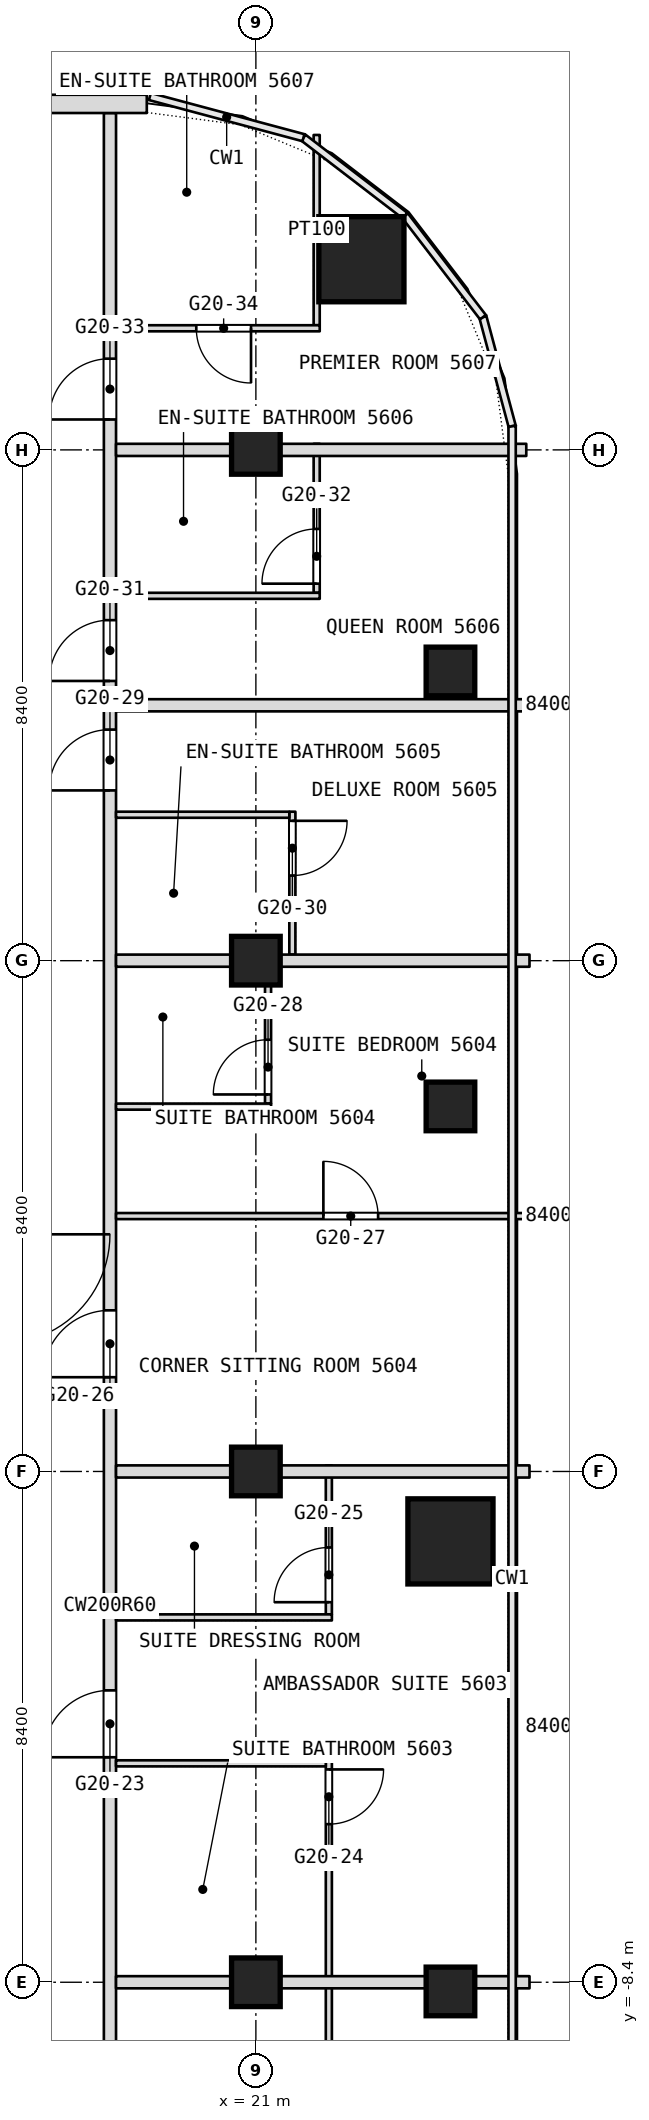
"""IFC4 building model, lengths in metres.
Left out: names, types, materials, properties, quantities, classifications, styles, units other than length and angle.
Written with IfcOpenShell. Run it as: python <this file> out.ifc"""

import sys

from ifc_helpers import new_model, si_unit, direction, frame, frame_2d, origin, origin_2d, place, context, subcontext, project, spatial, rectangle, extrude, element, fill, save


model = new_model("IFC4")
c1 = context("Model", 3, precision=1e-05, world=origin(), true_north=direction((0.0, 1.0)))
c2 = subcontext(c1, "Body", "Model", "MODEL_VIEW")
j1 = project(units=[si_unit("LENGTHUNIT", "METRE"), si_unit("PLANEANGLEUNIT", "RADIAN")], contexts=[c1])
p1 = place(None, origin())
s1 = spatial("IfcSite", under=j1, at=p1, CompositionType="ELEMENT")
p2 = place(p1, origin())
s2 = spatial("IfcBuilding", under=s1, at=p2, CompositionType="ELEMENT")
p3 = place(p2, frame((0.0, 0.0, 238.1)))
s3 = spatial("IfcBuildingStorey", under=s2, at=p3, CompositionType="ELEMENT", Elevation=238.1)
for number, where, z_axis, x_axis in (
    (1, (24.2, -1.15, 0.0), (0.0, 0.0, 1.0), (1.0, 0.0, 0.0)),
    (2, (22.736, 19.936, 0.0), (0.0, 0.0, 1.0), (1.0, 0.0, 0.0)),
):
    element("IfcColumn", number, at=place(p3, frame(where, z_axis=z_axis, x_axis=x_axis)), inside=s3, PredefinedType="COLUMN", context=c2, shape_type="SweptSolid", body=[
        extrude(rectangle(XDim=1.4, YDim=1.4, at=origin_2d()), origin(), (0.0, 0.0, 1.0), 3.6),
    ])
for number, where, z_axis, x_axis in (
    (3, (21.0, -8.4, 0.0), (0.0, 0.0, 1.0), (1.0, 0.0, 0.0)),
    (4, (21.0, 0.0, 0.0), (0.0, 0.0, 1.0), (1.0, 0.0, 0.0)),
    (5, (21.0, 8.4, 0.0), (0.0, 0.0, 1.0), (1.0, 0.0, 0.0)),
    (6, (21.0, 16.8, 0.0), (0.0, 0.0, 1.0), (1.0, 0.0, 0.0)),
    (7, (24.2, 13.156, 0.0), (0.0, 0.0, 1.0), (1.0, 0.0, 0.0)),
    (8, (24.2, 6.003, 0.0), (0.0, 0.0, 1.0), (1.0, 0.0, 0.0)),
    (9, (24.2, -8.551, 0.0), (0.0, 0.0, 1.0), (1.0, 0.0, 0.0)),
):
    element("IfcColumn", number, at=place(p3, frame(where, z_axis=z_axis, x_axis=x_axis)), inside=s3, PredefinedType="COLUMN", context=c2, shape_type="SweptSolid", body=[
        extrude(rectangle(XDim=0.8, YDim=0.8, at=origin_2d()), origin(), (0.0, 0.0, 1.0), 3.6),
    ])
p4 = place(p3, frame((22.2, -11.95, 0.0), z_axis=(0.0, 0.0, 1.0), x_axis=(0.0, 1.0, 0.0)))
e10 = element("IfcWall", 10, at=p4, inside=s3, PredefinedType="PARTITIONING", context=c2, shape_type="SweptSolid", body=[
    extrude(rectangle(XDim=7.2, YDim=0.1, at=frame_2d((3.6, 0.0))), origin(), (0.0, 0.0, 1.0), 3.34),
])
p5 = place(p4, frame((0.15, 0.0, 0.0)))
e11 = element("IfcOpeningElement", 11, at=p5, cuts=e10, PredefinedType="OPENING", context=c2, shape_type="SweptSolid", body=[
    extrude(rectangle(XDim=0.9, YDim=2.1, at=frame_2d((0.45, 1.05))), frame((0.0, 0.05, 0.0), z_axis=(0.0, -1.0, 0.0), x_axis=(1.0, 0.0, 0.0)), (0.0, 0.0, 1.0), 0.1),
])
p6 = place(p4, frame((6.15, 0.0, 0.0)))
e12 = element("IfcOpeningElement", 12, at=p6, cuts=e10, PredefinedType="OPENING", context=c2, shape_type="SweptSolid", body=[
    extrude(rectangle(XDim=0.9, YDim=2.1, at=frame_2d((0.45, 1.05))), frame((0.0, 0.05, 0.0), z_axis=(0.0, -1.0, 0.0), x_axis=(1.0, 0.0, 0.0)), (0.0, 0.0, 1.0), 0.1),
])
p7 = place(p3, frame((22.2, -2.35, 0.0), z_axis=(0.0, 0.0, 1.0), x_axis=(0.0, 1.0, 0.0)))
e13 = element("IfcWall", 13, at=p7, inside=s3, PredefinedType="PARTITIONING", context=c2, shape_type="SweptSolid", body=[
    extrude(rectangle(XDim=2.45, YDim=0.1, at=frame_2d((1.225, 0.0))), origin(), (0.0, 0.0, 1.0), 3.34),
])
p8 = place(p7, frame((0.2, 0.0, 0.0)))
e14 = element("IfcOpeningElement", 14, at=p8, cuts=e13, PredefinedType="OPENING", context=c2, shape_type="SweptSolid", body=[
    extrude(rectangle(XDim=0.9, YDim=2.1, at=frame_2d((0.45, 1.05))), frame((0.0, 0.05, 0.0), z_axis=(0.0, -1.0, 0.0), x_axis=(1.0, 0.0, 0.0)), (0.0, 0.0, 1.0), 0.1),
])
p9 = place(p3, frame((22.0, 14.45, 0.0), z_axis=(0.0, 0.0, 1.0), x_axis=(0.0, 1.0, 0.0)))
e15 = element("IfcWall", 15, at=p9, inside=s3, PredefinedType="PARTITIONING", context=c2, shape_type="SweptSolid", body=[
    extrude(rectangle(XDim=2.45, YDim=0.1, at=frame_2d((1.225, 0.0))), origin(), (0.0, 0.0, 1.0), 3.34),
])
p10 = place(p9, frame((0.15, 0.0, 0.0)))
e16 = element("IfcOpeningElement", 16, at=p10, cuts=e15, PredefinedType="OPENING", context=c2, shape_type="SweptSolid", body=[
    extrude(rectangle(XDim=0.9, YDim=2.1, at=frame_2d((0.45, 1.05))), frame((0.0, 0.05, 0.0), z_axis=(0.0, -1.0, 0.0), x_axis=(1.0, 0.0, 0.0)), (0.0, 0.0, 1.0), 0.1),
])
p11 = place(p3, frame((22.0, 18.85, 0.0), z_axis=(0.0, 0.0, 1.0), x_axis=(0.0, 1.0, 0.0)))
e17 = element("IfcWall", 17, at=p11, inside=s3, PredefinedType="PARTITIONING", context=c2, shape_type="SweptSolid", body=[
    extrude(rectangle(XDim=3.129, YDim=0.1, at=frame_2d((1.564, 0.0))), origin(), (0.0, 0.0, 1.0), 3.34),
])
p12 = place(p3, frame((21.6, 8.5, 0.0), z_axis=(0.0, 0.0, 1.0), x_axis=(0.0, 1.0, 0.0)))
e18 = element("IfcWall", 18, at=p12, inside=s3, PredefinedType="PARTITIONING", context=c2, shape_type="SweptSolid", body=[
    extrude(rectangle(XDim=2.35, YDim=0.1, at=frame_2d((1.175, 0.0))), origin(), (0.0, 0.0, 1.0), 3.34),
])
p13 = place(p12, frame((1.3, 0.0, 0.0)))
e19 = element("IfcOpeningElement", 19, at=p13, cuts=e18, PredefinedType="OPENING", context=c2, shape_type="SweptSolid", body=[
    extrude(rectangle(XDim=0.9, YDim=2.1, at=frame_2d((0.45, 1.05))), frame((0.0, 0.05, 0.0), z_axis=(0.0, -1.0, 0.0), x_axis=(1.0, 0.0, 0.0)), (0.0, 0.0, 1.0), 0.1),
])
p14 = place(p3, frame((21.2, 6.05, 0.0), z_axis=(0.0, 0.0, 1.0), x_axis=(0.0, 1.0, 0.0)))
e20 = element("IfcWall", 20, at=p14, inside=s3, PredefinedType="PARTITIONING", context=c2, shape_type="SweptSolid", body=[
    extrude(rectangle(XDim=2.45, YDim=0.1, at=frame_2d((1.225, 0.0))), origin(), (0.0, 0.0, 1.0), 3.34),
])
p15 = place(p14, frame((0.15, 0.0, 0.0)))
e21 = element("IfcOpeningElement", 21, at=p15, cuts=e20, PredefinedType="OPENING", context=c2, shape_type="SweptSolid", body=[
    extrude(rectangle(XDim=0.9, YDim=2.1, at=frame_2d((0.45, 1.05))), frame((0.0, 0.05, 0.0), z_axis=(0.0, -1.0, 0.0), x_axis=(1.0, 0.0, 0.0)), (0.0, 0.0, 1.0), 0.1),
])
p16 = place(p3, frame((18.6, -26.751, 0.0), z_axis=(0.0, 0.0, 1.0), x_axis=(0.0, 1.0, 0.0)))
e22 = element("IfcWall", 22, at=p16, inside=s3, PredefinedType="PARTITIONING", context=c2, shape_type="SweptSolid", body=[
    extrude(rectangle(XDim=49.091, YDim=0.2, at=frame_2d((24.545, 0.0))), origin(), (0.0, 0.0, 1.0), 3.34),
])
p17 = place(p16, frame((6.988, 0.0, 0.0)))
e23 = element("IfcOpeningElement", 23, at=p17, cuts=e22, PredefinedType="OPENING", context=c2, shape_type="SweptSolid", body=[
    extrude(rectangle(XDim=1.1, YDim=2.1, at=frame_2d((0.55, 1.05))), frame((0.0, 0.1, 0.0), z_axis=(0.0, -1.0, 0.0), x_axis=(1.0, 0.0, 0.0)), (0.0, 0.0, 1.0), 0.2),
])
p18 = place(p16, frame((13.551, 0.0, 0.0)))
e24 = element("IfcOpeningElement", 24, at=p18, cuts=e22, PredefinedType="OPENING", context=c2, shape_type="SweptSolid", body=[
    extrude(rectangle(XDim=1.1, YDim=2.1, at=frame_2d((0.55, 1.05))), frame((0.0, 0.1, 0.0), z_axis=(0.0, -1.0, 0.0), x_axis=(1.0, 0.0, 0.0)), (0.0, 0.0, 1.0), 0.2),
])
p19 = place(p16, frame((22.051, 0.0, 0.0)))
e25 = element("IfcOpeningElement", 25, at=p19, cuts=e22, PredefinedType="OPENING", context=c2, shape_type="SweptSolid", body=[
    extrude(rectangle(XDim=1.1, YDim=2.1, at=frame_2d((0.55, 1.05))), frame((0.0, 0.1, 0.0), z_axis=(0.0, -1.0, 0.0), x_axis=(1.0, 0.0, 0.0)), (0.0, 0.0, 1.0), 0.2),
])
p20 = place(p16, frame((28.301, 0.0, 0.0)))
e26 = element("IfcOpeningElement", 26, at=p20, cuts=e22, PredefinedType="OPENING", context=c2, shape_type="SweptSolid", body=[
    extrude(rectangle(XDim=1.1, YDim=2.1, at=frame_2d((0.55, 1.05))), frame((0.0, 0.1, 0.0), z_axis=(0.0, -1.0, 0.0), x_axis=(1.0, 0.0, 0.0)), (0.0, 0.0, 1.0), 0.2),
])
p21 = place(p16, frame((37.951, 0.0, 0.0)))
e27 = element("IfcOpeningElement", 27, at=p21, cuts=e22, PredefinedType="OPENING", context=c2, shape_type="SweptSolid", body=[
    extrude(rectangle(XDim=1.0, YDim=2.1, at=frame_2d((0.5, 1.05))), frame((0.0, 0.1, 0.0), z_axis=(0.0, -1.0, 0.0), x_axis=(1.0, 0.0, 0.0)), (0.0, 0.0, 1.0), 0.2),
])
p22 = place(p16, frame((39.751, 0.0, 0.0)))
e28 = element("IfcOpeningElement", 28, at=p22, cuts=e22, PredefinedType="OPENING", context=c2, shape_type="SweptSolid", body=[
    extrude(rectangle(XDim=1.0, YDim=2.1, at=frame_2d((0.5, 1.05))), frame((0.0, 0.1, 0.0), z_axis=(0.0, -1.0, 0.0), x_axis=(1.0, 0.0, 0.0)), (0.0, 0.0, 1.0), 0.2),
])
p23 = place(p16, frame((44.051, 0.0, 0.0)))
e29 = element("IfcOpeningElement", 29, at=p23, cuts=e22, PredefinedType="OPENING", context=c2, shape_type="SweptSolid", body=[
    extrude(rectangle(XDim=1.0, YDim=2.1, at=frame_2d((0.5, 1.05))), frame((0.0, 0.1, 0.0), z_axis=(0.0, -1.0, 0.0), x_axis=(1.0, 0.0, 0.0)), (0.0, 0.0, 1.0), 0.2),
])
p24 = place(p3, frame((18.7, -8.4, 0.0), z_axis=(0.0, 0.0, 1.0), x_axis=(1.0, 0.0, 0.0)))
e30 = element("IfcWall", 30, at=p24, inside=s3, PredefinedType="PARTITIONING", context=c2, shape_type="SweptSolid", body=[
    extrude(rectangle(XDim=6.8, YDim=0.2, at=frame_2d((3.4, 0.0))), origin(), (0.0, 0.0, 1.0), 2.94),
])
p25 = place(p3, frame((18.7, -4.8, 0.0), z_axis=(0.0, 0.0, 1.0), x_axis=(1.0, 0.0, 0.0)))
e31 = element("IfcWall", 31, at=p25, inside=s3, PredefinedType="PARTITIONING", context=c2, shape_type="SweptSolid", body=[
    extrude(rectangle(XDim=3.45, YDim=0.1, at=frame_2d((1.725, 0.0))), origin(), (0.0, 0.0, 1.0), 3.34),
])
p26 = place(p3, frame((18.7, -2.4, 0.0), z_axis=(0.0, 0.0, 1.0), x_axis=(1.0, 0.0, 0.0)))
e32 = element("IfcWall", 32, at=p26, inside=s3, PredefinedType="PARTITIONING", context=c2, shape_type="SweptSolid", body=[
    extrude(rectangle(XDim=3.55, YDim=0.1, at=frame_2d((1.775, 0.0))), origin(), (0.0, 0.0, 1.0), 3.34),
])
p27 = place(p3, frame((18.7, 0.0, 0.0), z_axis=(0.0, 0.0, 1.0), x_axis=(1.0, 0.0, 0.0)))
e33 = element("IfcWall", 33, at=p27, inside=s3, PredefinedType="PARTITIONING", context=c2, shape_type="SweptSolid", body=[
    extrude(rectangle(XDim=6.8, YDim=0.2, at=frame_2d((3.4, 0.0))), origin(), (0.0, 0.0, 1.0), 2.94),
])
p28 = place(p3, frame((18.7, 4.2, 0.0), z_axis=(0.0, 0.0, 1.0), x_axis=(1.0, 0.0, 0.0)))
e34 = element("IfcWall", 34, at=p28, inside=s3, PredefinedType="PARTITIONING", context=c2, shape_type="SweptSolid", body=[
    extrude(rectangle(XDim=6.8, YDim=0.1, at=frame_2d((3.4, 0.0))), origin(), (0.0, 0.0, 1.0), 3.34),
])
p29 = place(p28, frame((3.41, 0.0, 0.0)))
e35 = element("IfcOpeningElement", 35, at=p29, cuts=e34, PredefinedType="OPENING", context=c2, shape_type="SweptSolid", body=[
    extrude(rectangle(XDim=0.9, YDim=2.1, at=frame_2d((0.45, 1.05))), frame((0.0, 0.05, 0.0), z_axis=(0.0, -1.0, 0.0), x_axis=(1.0, 0.0, 0.0)), (0.0, 0.0, 1.0), 0.1),
])
p30 = place(p3, frame((18.7, 6.0, 0.0), z_axis=(0.0, 0.0, 1.0), x_axis=(1.0, 0.0, 0.0)))
e36 = element("IfcWall", 36, at=p30, inside=s3, PredefinedType="PARTITIONING", context=c2, shape_type="SweptSolid", body=[
    extrude(rectangle(XDim=2.55, YDim=0.1, at=frame_2d((1.275, 0.0))), origin(), (0.0, 0.0, 1.0), 3.34),
])
p31 = place(p3, frame((18.7, 8.4, 0.0), z_axis=(0.0, 0.0, 1.0), x_axis=(1.0, 0.0, 0.0)))
e37 = element("IfcWall", 37, at=p31, inside=s3, PredefinedType="PARTITIONING", context=c2, shape_type="SweptSolid", body=[
    extrude(rectangle(XDim=6.8, YDim=0.2, at=frame_2d((3.4, 0.0))), origin(), (0.0, 0.0, 1.0), 2.94),
])
p32 = place(p3, frame((18.7, 10.8, 0.0), z_axis=(0.0, 0.0, 1.0), x_axis=(1.0, 0.0, 0.0)))
e38 = element("IfcWall", 38, at=p32, inside=s3, PredefinedType="PARTITIONING", context=c2, shape_type="SweptSolid", body=[
    extrude(rectangle(XDim=2.85, YDim=0.1, at=frame_2d((1.425, 0.0))), origin(), (0.0, 0.0, 1.0), 3.34),
])
p33 = place(p3, frame((18.7, 12.6, 0.0), z_axis=(0.0, 0.0, 1.0), x_axis=(1.0, 0.0, 0.0)))
e39 = element("IfcWall", 39, at=p33, inside=s3, PredefinedType="PARTITIONING", context=c2, shape_type="SweptSolid", body=[
    extrude(rectangle(XDim=6.8, YDim=0.2, at=frame_2d((3.4, 0.0))), origin(), (0.0, 0.0, 1.0), 3.34),
])
p34 = place(p3, frame((18.7, 14.4, 0.0), z_axis=(0.0, 0.0, 1.0), x_axis=(1.0, 0.0, 0.0)))
e40 = element("IfcWall", 40, at=p34, inside=s3, PredefinedType="PARTITIONING", context=c2, shape_type="SweptSolid", body=[
    extrude(rectangle(XDim=3.35, YDim=0.1, at=frame_2d((1.675, 0.0))), origin(), (0.0, 0.0, 1.0), 3.34),
])
p35 = place(p3, frame((18.7, 16.8, 0.0), z_axis=(0.0, 0.0, 1.0), x_axis=(1.0, 0.0, 0.0)))
e41 = element("IfcWall", 41, at=p35, inside=s3, PredefinedType="PARTITIONING", context=c2, shape_type="SweptSolid", body=[
    extrude(rectangle(XDim=6.747, YDim=0.2, at=frame_2d((3.374, 0.0))), origin(), (0.0, 0.0, 1.0), 2.94),
])
p36 = place(p3, frame((18.7, 18.8, 0.0), z_axis=(0.0, 0.0, 1.0), x_axis=(1.0, 0.0, 0.0)))
e42 = element("IfcWall", 42, at=p36, inside=s3, PredefinedType="PARTITIONING", context=c2, shape_type="SweptSolid", body=[
    extrude(rectangle(XDim=3.35, YDim=0.1, at=frame_2d((1.675, 0.0))), origin(), (0.0, 0.0, 1.0), 3.34),
])
p37 = place(p36, frame((1.32, 0.0, 0.0)))
e43 = element("IfcOpeningElement", 43, at=p37, cuts=e42, PredefinedType="OPENING", context=c2, shape_type="SweptSolid", body=[
    extrude(rectangle(XDim=0.9, YDim=2.1, at=frame_2d((0.45, 1.05))), frame((0.0, 0.05, 0.0), z_axis=(0.0, -1.0, 0.0), x_axis=(1.0, 0.0, 0.0)), (0.0, 0.0, 1.0), 0.1),
])
p38 = place(p3, frame((19.206, 22.49, 0.0), z_axis=(0.0, 0.0, 1.0), x_axis=(-1.0, 0.0, 0.0)))
e44 = element("IfcWall", 44, at=p38, inside=s3, PredefinedType="NOTDEFINED", context=c2, shape_type="SweptSolid", body=[
    extrude(rectangle(XDim=38.412, YDim=0.3, at=frame_2d((19.206, 0.0))), origin(), (0.0, 0.0, 1.0), 3.6),
])
p39 = place(p38, frame((3.306, 0.0, 0.9)))
e45 = element("IfcOpeningElement", 45, at=p39, cuts=e44, PredefinedType="OPENING", context=c2, shape_type="SweptSolid", body=[
    extrude(rectangle(XDim=2.4, YDim=2.1, at=frame_2d((1.2, 1.05))), frame((0.0, 0.15, 0.0), z_axis=(0.0, -1.0, 0.0), x_axis=(1.0, 0.0, 0.0)), (0.0, 0.0, 1.0), 0.3),
])
p40 = place(p38, frame((7.506, 0.0, 0.9)))
e46 = element("IfcOpeningElement", 46, at=p40, cuts=e44, PredefinedType="OPENING", context=c2, shape_type="SweptSolid", body=[
    extrude(rectangle(XDim=2.4, YDim=2.1, at=frame_2d((1.2, 1.05))), frame((0.0, 0.15, 0.0), z_axis=(0.0, -1.0, 0.0), x_axis=(1.0, 0.0, 0.0)), (0.0, 0.0, 1.0), 0.3),
])
p41 = place(p38, frame((11.706, 0.0, 0.9)))
e47 = element("IfcOpeningElement", 47, at=p41, cuts=e44, PredefinedType="OPENING", context=c2, shape_type="SweptSolid", body=[
    extrude(rectangle(XDim=2.4, YDim=2.1, at=frame_2d((1.2, 1.05))), frame((0.0, 0.15, 0.0), z_axis=(0.0, -1.0, 0.0), x_axis=(1.0, 0.0, 0.0)), (0.0, 0.0, 1.0), 0.3),
])
p42 = place(p38, frame((15.906, 0.0, 0.9)))
e48 = element("IfcOpeningElement", 48, at=p42, cuts=e44, PredefinedType="OPENING", context=c2, shape_type="SweptSolid", body=[
    extrude(rectangle(XDim=2.4, YDim=2.1, at=frame_2d((1.2, 1.05))), frame((0.0, 0.15, 0.0), z_axis=(0.0, -1.0, 0.0), x_axis=(1.0, 0.0, 0.0)), (0.0, 0.0, 1.0), 0.3),
])
p43 = place(p38, frame((20.106, 0.0, 0.9)))
e49 = element("IfcOpeningElement", 49, at=p43, cuts=e44, PredefinedType="OPENING", context=c2, shape_type="SweptSolid", body=[
    extrude(rectangle(XDim=2.4, YDim=2.1, at=frame_2d((1.2, 1.05))), frame((0.0, 0.15, 0.0), z_axis=(0.0, -1.0, 0.0), x_axis=(1.0, 0.0, 0.0)), (0.0, 0.0, 1.0), 0.3),
])
p44 = place(p38, frame((24.306, 0.0, 0.9)))
e50 = element("IfcOpeningElement", 50, at=p44, cuts=e44, PredefinedType="OPENING", context=c2, shape_type="SweptSolid", body=[
    extrude(rectangle(XDim=2.4, YDim=2.1, at=frame_2d((1.2, 1.05))), frame((0.0, 0.15, 0.0), z_axis=(0.0, -1.0, 0.0), x_axis=(1.0, 0.0, 0.0)), (0.0, 0.0, 1.0), 0.3),
])
p45 = place(p38, frame((28.506, 0.0, 0.9)))
e51 = element("IfcOpeningElement", 51, at=p45, cuts=e44, PredefinedType="OPENING", context=c2, shape_type="SweptSolid", body=[
    extrude(rectangle(XDim=2.4, YDim=2.1, at=frame_2d((1.2, 1.05))), frame((0.0, 0.15, 0.0), z_axis=(0.0, -1.0, 0.0), x_axis=(1.0, 0.0, 0.0)), (0.0, 0.0, 1.0), 0.3),
])
p46 = place(p38, frame((32.706, 0.0, 0.9)))
e52 = element("IfcOpeningElement", 52, at=p46, cuts=e44, PredefinedType="OPENING", context=c2, shape_type="SweptSolid", body=[
    extrude(rectangle(XDim=2.4, YDim=2.1, at=frame_2d((1.2, 1.05))), frame((0.0, 0.15, 0.0), z_axis=(0.0, -1.0, 0.0), x_axis=(1.0, 0.0, 0.0)), (0.0, 0.0, 1.0), 0.3),
])
p47 = place(p6, origin())
e53 = element("IfcDoor", 53, at=p47, inside=s3, OperationType="SINGLE_SWING_RIGHT", PredefinedType="DOOR", context=c2, shape_type="SweptSolid", body=[
    extrude(rectangle(XDim=0.9, YDim=2.1, at=frame_2d((0.45, 1.05))), frame((0.0, 0.025, 0.0), z_axis=(0.0, -1.0, 0.0), x_axis=(1.0, 0.0, 0.0)), (0.0, 0.0, 1.0), 0.05),
])
fill(e12, e53)
p48 = place(p8, origin())
e54 = element("IfcDoor", 54, at=p48, inside=s3, OperationType="SINGLE_SWING_LEFT", PredefinedType="DOOR", context=c2, shape_type="SweptSolid", body=[
    extrude(rectangle(XDim=0.9, YDim=2.1, at=frame_2d((0.45, 1.05))), frame((0.0, 0.025, 0.0), z_axis=(0.0, -1.0, 0.0), x_axis=(1.0, 0.0, 0.0)), (0.0, 0.0, 1.0), 0.05),
])
fill(e14, e54)
p49 = place(p10, origin())
e55 = element("IfcDoor", 55, at=p49, inside=s3, OperationType="SINGLE_SWING_LEFT", PredefinedType="DOOR", context=c2, shape_type="SweptSolid", body=[
    extrude(rectangle(XDim=0.9, YDim=2.1, at=frame_2d((0.45, 1.05))), frame((0.0, 0.025, 0.0), z_axis=(0.0, -1.0, 0.0), x_axis=(1.0, 0.0, 0.0)), (0.0, 0.0, 1.0), 0.05),
])
fill(e16, e55)
p50 = place(p13, origin())
e56 = element("IfcDoor", 56, at=p50, inside=s3, OperationType="SINGLE_SWING_RIGHT", PredefinedType="DOOR", context=c2, shape_type="SweptSolid", body=[
    extrude(rectangle(XDim=0.9, YDim=2.1, at=frame_2d((0.45, 1.05))), frame((0.0, 0.025, 0.0), z_axis=(0.0, -1.0, 0.0), x_axis=(1.0, 0.0, 0.0)), (0.0, 0.0, 1.0), 0.05),
])
fill(e19, e56)
p51 = place(p15, origin())
e57 = element("IfcDoor", 57, at=p51, inside=s3, OperationType="SINGLE_SWING_LEFT", PredefinedType="DOOR", context=c2, shape_type="SweptSolid", body=[
    extrude(rectangle(XDim=0.9, YDim=2.1, at=frame_2d((0.45, 1.05))), frame((0.0, 0.025, 0.0), z_axis=(0.0, -1.0, 0.0), x_axis=(1.0, 0.0, 0.0)), (0.0, 0.0, 1.0), 0.05),
])
fill(e21, e57)
p52 = place(p19, origin())
e58 = element("IfcDoor", 58, at=p52, inside=s3, OperationType="SINGLE_SWING_RIGHT", PredefinedType="DOOR", context=c2, shape_type="SweptSolid", body=[
    extrude(rectangle(XDim=1.1, YDim=2.1, at=frame_2d((0.55, 1.05))), frame((0.0, 0.025, 0.0), z_axis=(0.0, -1.0, 0.0), x_axis=(1.0, 0.0, 0.0)), (0.0, 0.0, 1.0), 0.05),
])
fill(e25, e58)
p53 = place(p20, origin())
e59 = element("IfcDoor", 59, at=p53, inside=s3, OperationType="SINGLE_SWING_RIGHT", PredefinedType="DOOR", context=c2, shape_type="SweptSolid", body=[
    extrude(rectangle(XDim=1.1, YDim=2.1, at=frame_2d((0.55, 1.05))), frame((0.0, 0.025, 0.0), z_axis=(0.0, -1.0, 0.0), x_axis=(1.0, 0.0, 0.0)), (0.0, 0.0, 1.0), 0.05),
])
fill(e26, e59)
p54 = place(p21, origin())
e60 = element("IfcDoor", 60, at=p54, inside=s3, OperationType="SINGLE_SWING_LEFT", PredefinedType="DOOR", context=c2, shape_type="SweptSolid", body=[
    extrude(rectangle(XDim=1.0, YDim=2.1, at=frame_2d((0.5, 1.05))), frame((0.0, 0.025, 0.0), z_axis=(0.0, -1.0, 0.0), x_axis=(1.0, 0.0, 0.0)), (0.0, 0.0, 1.0), 0.05),
])
fill(e27, e60)
p55 = place(p22, origin())
e61 = element("IfcDoor", 61, at=p55, inside=s3, OperationType="SINGLE_SWING_LEFT", PredefinedType="DOOR", context=c2, shape_type="SweptSolid", body=[
    extrude(rectangle(XDim=1.0, YDim=2.1, at=frame_2d((0.5, 1.05))), frame((0.0, 0.025, 0.0), z_axis=(0.0, -1.0, 0.0), x_axis=(1.0, 0.0, 0.0)), (0.0, 0.0, 1.0), 0.05),
])
fill(e28, e61)
p56 = place(p23, origin())
e62 = element("IfcDoor", 62, at=p56, inside=s3, OperationType="SINGLE_SWING_LEFT", PredefinedType="DOOR", context=c2, shape_type="SweptSolid", body=[
    extrude(rectangle(XDim=1.0, YDim=2.1, at=frame_2d((0.5, 1.05))), frame((0.0, 0.025, 0.0), z_axis=(0.0, -1.0, 0.0), x_axis=(1.0, 0.0, 0.0)), (0.0, 0.0, 1.0), 0.05),
])
fill(e29, e62)
p57 = place(p29, origin())
e63 = element("IfcDoor", 63, at=p57, inside=s3, OperationType="SINGLE_SWING_RIGHT", PredefinedType="DOOR", context=c2, shape_type="SweptSolid", body=[
    extrude(rectangle(XDim=0.9, YDim=2.1, at=frame_2d((0.45, 1.05))), frame((0.0, 0.025, 0.0), z_axis=(0.0, -1.0, 0.0), x_axis=(1.0, 0.0, 0.0)), (0.0, 0.0, 1.0), 0.05),
])
fill(e35, e63)
p58 = place(p37, origin())
e64 = element("IfcDoor", 64, at=p58, inside=s3, OperationType="SINGLE_SWING_RIGHT", PredefinedType="DOOR", context=c2, shape_type="SweptSolid", body=[
    extrude(rectangle(XDim=0.9, YDim=2.1, at=frame_2d((0.45, 1.05))), frame((0.0, 0.025, 0.0), z_axis=(0.0, -1.0, 0.0), x_axis=(1.0, 0.0, 0.0)), (0.0, 0.0, 1.0), 0.05),
])
fill(e43, e64)
save(model, sys.argv[1])
